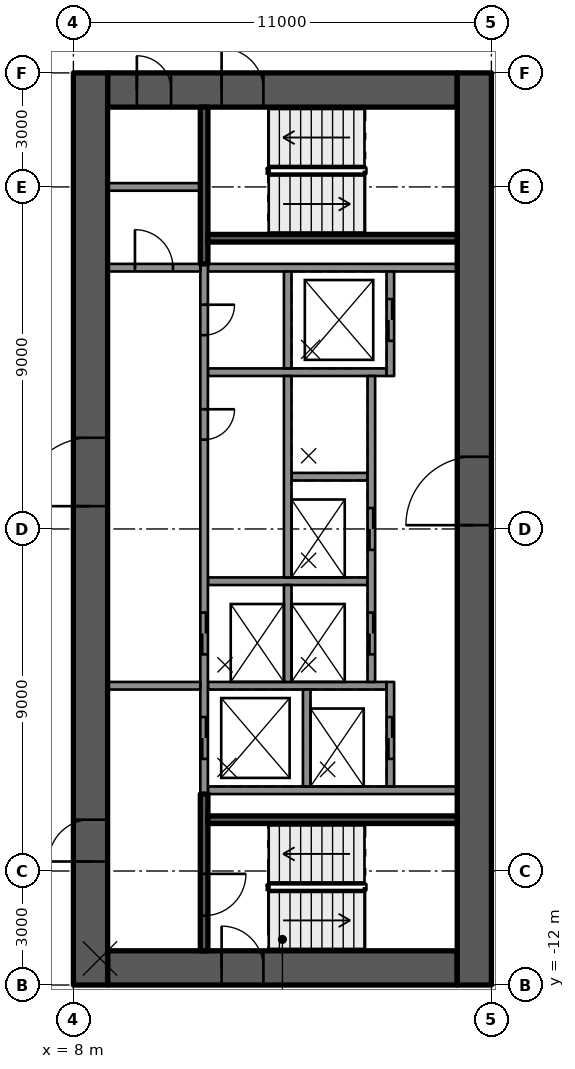
"""IFC4 building model, lengths in metres.
Left out: names, types, materials, properties, quantities, classifications, styles, units other than length and angle.
Written with IfcOpenShell. Run it as: python <this file> out.ifc"""

import sys

from ifc_helpers import new_model, si_unit, direction, frame, frame_2d, origin, place, context, subcontext, project, spatial, rectangle, extrude, element, fill, save


model = new_model("IFC4")
c1 = context("Model", 3, precision=1e-05, world=origin(), true_north=direction((0.0, 1.0)))
c2 = subcontext(c1, "Body", "Model", "MODEL_VIEW")
j1 = project(units=[si_unit("LENGTHUNIT", "METRE"), si_unit("PLANEANGLEUNIT", "RADIAN")], contexts=[c1])
p1 = place(None, origin())
s1 = spatial("IfcSite", under=j1, at=p1, CompositionType="ELEMENT")
p2 = place(p1, origin())
s2 = spatial("IfcBuilding", under=s1, at=p2, CompositionType="ELEMENT")
p3 = place(p2, frame((0.0, 0.0, 149.1)))
s3 = spatial("IfcBuildingStorey", under=s2, at=p3, CompositionType="ELEMENT", Elevation=149.1)
p4 = place(p3, frame((8.9, 11.55, 0.0), z_axis=(0.0, 0.0, 1.0), x_axis=(1.0, 0.0, 0.0)))
e1 = element("IfcWall", 1, at=p4, inside=s3, PredefinedType="SHEAR", context=c2, shape_type="SweptSolid", body=[
    extrude(rectangle(XDim=9.2, YDim=0.9, at=frame_2d((4.6, 0.0))), origin(), (0.0, 0.0, 1.0), 3.5),
])
p5 = place(p4, frame((3.0, 0.0, 0.0)))
e2 = element("IfcOpeningElement", 2, at=p5, cuts=e1, PredefinedType="OPENING", context=c2, shape_type="SweptSolid", body=[
    extrude(rectangle(XDim=1.1, YDim=2.1, at=frame_2d((0.55, 1.05))), frame((0.0, 0.46, 0.0), z_axis=(0.0, -1.0, 0.0), x_axis=(1.0, 0.0, 0.0)), (0.0, 0.0, 1.0), 0.92),
])
p6 = place(p4, frame((0.77, 0.0, 0.0)))
e3 = element("IfcOpeningElement", 3, at=p6, cuts=e1, PredefinedType="OPENING", context=c2, shape_type="SweptSolid", body=[
    extrude(rectangle(XDim=0.9, YDim=2.1, at=frame_2d((0.45, 1.05))), frame((0.0, 0.46, 0.0), z_axis=(0.0, -1.0, 0.0), x_axis=(1.0, 0.0, 0.0)), (0.0, 0.0, 1.0), 0.92),
])
p7 = place(p3, frame((8.9, -11.55, 0.0), z_axis=(0.0, 0.0, 1.0), x_axis=(1.0, 0.0, 0.0)))
e4 = element("IfcWall", 4, at=p7, inside=s3, PredefinedType="SHEAR", context=c2, shape_type="SweptSolid", body=[
    extrude(rectangle(XDim=9.2, YDim=0.9, at=frame_2d((4.6, 0.0))), origin(), (0.0, 0.0, 1.0), 3.5),
])
p8 = place(p7, frame((3.0, 0.0, 0.0)))
e5 = element("IfcOpeningElement", 5, at=p8, cuts=e4, PredefinedType="OPENING", context=c2, shape_type="SweptSolid", body=[
    extrude(rectangle(XDim=1.1, YDim=2.1, at=frame_2d((0.55, 1.05))), frame((0.0, 0.46, 0.0), z_axis=(0.0, -1.0, 0.0), x_axis=(1.0, 0.0, 0.0)), (0.0, 0.0, 1.0), 0.92),
])
p9 = place(p3, frame((8.45, -12.0, 0.0), z_axis=(0.0, 0.0, 1.0), x_axis=(0.0, 1.0, 0.0)))
e6 = element("IfcWall", 6, at=p9, inside=s3, PredefinedType="SHEAR", context=c2, shape_type="SweptSolid", body=[
    extrude(rectangle(XDim=24.0, YDim=0.9, at=frame_2d((12.0, 0.0))), origin(), (0.0, 0.0, 1.0), 3.5),
])
p10 = place(p9, frame((12.6, 0.0, 0.0)))
e7 = element("IfcOpeningElement", 7, at=p10, cuts=e6, PredefinedType="OPENING", context=c2, shape_type="SweptSolid", body=[
    extrude(rectangle(XDim=1.8, YDim=2.1, at=frame_2d((0.9, 1.05))), frame((0.0, 0.46, 0.0), z_axis=(0.0, -1.0, 0.0), x_axis=(1.0, 0.0, 0.0)), (0.0, 0.0, 1.0), 0.92),
])
p11 = place(p9, frame((3.25, 0.0, 0.0)))
e8 = element("IfcOpeningElement", 8, at=p11, cuts=e6, PredefinedType="OPENING", context=c2, shape_type="SweptSolid", body=[
    extrude(rectangle(XDim=1.1, YDim=2.1, at=frame_2d((0.55, 1.05))), frame((0.0, 0.46, 0.0), z_axis=(0.0, -1.0, 0.0), x_axis=(1.0, 0.0, 0.0)), (0.0, 0.0, 1.0), 0.92),
])
p12 = place(p3, frame((18.55, -12.0, 0.0), z_axis=(0.0, 0.0, 1.0), x_axis=(0.0, 1.0, 0.0)))
e9 = element("IfcWall", 9, at=p12, inside=s3, PredefinedType="SHEAR", context=c2, shape_type="SweptSolid", body=[
    extrude(rectangle(XDim=24.0, YDim=0.9, at=frame_2d((12.0, 0.0))), origin(), (0.0, 0.0, 1.0), 3.5),
])
p13 = place(p12, frame((12.1, 0.0, 0.0)))
e10 = element("IfcOpeningElement", 10, at=p13, cuts=e9, PredefinedType="OPENING", context=c2, shape_type="SweptSolid", body=[
    extrude(rectangle(XDim=1.8, YDim=2.1, at=frame_2d((0.9, 1.05))), frame((0.0, 0.46, 0.0), z_axis=(0.0, -1.0, 0.0), x_axis=(1.0, 0.0, 0.0)), (0.0, 0.0, 1.0), 0.92),
])
for number, where, z_axis, x_axis in (
    (11, (11.54, -6.875, 0.0), (0.0, 0.0, 1.0), (1.0, 0.0, 0.0)),
    (12, (11.54, 6.875, 0.0), (0.0, 0.0, 1.0), (1.0, 0.0, 0.0)),
):
    element("IfcWall", number, at=place(p3, frame(where, z_axis=z_axis, x_axis=x_axis)), inside=s3, PredefinedType="SOLIDWALL", context=c2, shape_type="SweptSolid", body=[
        extrude(rectangle(XDim=6.56, YDim=0.2, at=frame_2d((3.28, 0.0))), origin(), (0.0, 0.0, 1.0), 3.09),
    ])
p14 = place(p3, frame((11.54, 4.125, 0.0), z_axis=(0.0, 0.0, 1.0), x_axis=(1.0, 0.0, 0.0)))
e13 = element("IfcWall", 13, at=p14, inside=s3, PredefinedType="SOLIDWALL", context=c2, shape_type="SweptSolid", body=[
    extrude(rectangle(XDim=4.7, YDim=0.2, at=frame_2d((2.35, 0.0))), origin(), (0.0, 0.0, 1.0), 3.09),
])
p15 = place(p3, frame((13.74, 1.375, 0.0), z_axis=(0.0, 0.0, 1.0), x_axis=(1.0, 0.0, 0.0)))
e14 = element("IfcWall", 14, at=p15, inside=s3, PredefinedType="SOLIDWALL", context=c2, shape_type="SweptSolid", body=[
    extrude(rectangle(XDim=2.0, YDim=0.2, at=frame_2d((1.0, 0.0))), origin(), (0.0, 0.0, 1.0), 3.09),
])
p16 = place(p3, frame((11.54, -1.375, 0.0), z_axis=(0.0, 0.0, 1.0), x_axis=(1.0, 0.0, 0.0)))
e15 = element("IfcWall", 15, at=p16, inside=s3, PredefinedType="SOLIDWALL", context=c2, shape_type="SweptSolid", body=[
    extrude(rectangle(XDim=4.2, YDim=0.2, at=frame_2d((2.1, 0.0))), origin(), (0.0, 0.0, 1.0), 3.09),
])
p17 = place(p3, frame((11.54, -4.125, 0.0), z_axis=(0.0, 0.0, 1.0), x_axis=(1.0, 0.0, 0.0)))
e16 = element("IfcWall", 16, at=p17, inside=s3, PredefinedType="SOLIDWALL", context=c2, shape_type="SweptSolid", body=[
    extrude(rectangle(XDim=4.7, YDim=0.2, at=frame_2d((2.35, 0.0))), origin(), (0.0, 0.0, 1.0), 3.09),
])
p18 = place(p3, frame((11.44, 6.975, 0.0), z_axis=(0.0, 0.0, 1.0), x_axis=(0.0, -1.0, 0.0)))
e17 = element("IfcWall", 17, at=p18, inside=s3, PredefinedType="SOLIDWALL", context=c2, shape_type="SweptSolid", body=[
    extrude(rectangle(XDim=13.95, YDim=0.2, at=frame_2d((6.975, 0.0))), origin(), (0.0, 0.0, 1.0), 3.09),
])
p19 = place(p18, frame((9.175, 0.0, 0.0)))
e18 = element("IfcOpeningElement", 18, at=p19, cuts=e17, PredefinedType="OPENING", context=c2, shape_type="SweptSolid", body=[
    extrude(rectangle(XDim=1.1, YDim=2.1, at=frame_2d((0.55, 1.05))), frame((0.0, 0.11, 0.0), z_axis=(0.0, -1.0, 0.0), x_axis=(1.0, 0.0, 0.0)), (0.0, 0.0, 1.0), 0.22),
])
p20 = place(p18, frame((11.925, 0.0, 0.0)))
e19 = element("IfcOpeningElement", 19, at=p20, cuts=e17, PredefinedType="OPENING", context=c2, shape_type="SweptSolid", body=[
    extrude(rectangle(XDim=1.1, YDim=2.1, at=frame_2d((0.55, 1.05))), frame((0.0, 0.11, 0.0), z_axis=(0.0, -1.0, 0.0), x_axis=(1.0, 0.0, 0.0)), (0.0, 0.0, 1.0), 0.22),
])
p21 = place(p18, frame((1.075, 0.0, 0.0)))
e20 = element("IfcOpeningElement", 20, at=p21, cuts=e17, PredefinedType="OPENING", context=c2, shape_type="SweptSolid", body=[
    extrude(rectangle(XDim=0.8, YDim=2.1, at=frame_2d((0.4, 1.05))), frame((0.0, 0.11, 0.0), z_axis=(0.0, -1.0, 0.0), x_axis=(1.0, 0.0, 0.0)), (0.0, 0.0, 1.0), 0.22),
])
p22 = place(p18, frame((3.825, 0.0, 0.0)))
e21 = element("IfcOpeningElement", 21, at=p22, cuts=e17, PredefinedType="OPENING", context=c2, shape_type="SweptSolid", body=[
    extrude(rectangle(XDim=0.8, YDim=2.1, at=frame_2d((0.4, 1.05))), frame((0.0, 0.11, 0.0), z_axis=(0.0, -1.0, 0.0), x_axis=(1.0, 0.0, 0.0)), (0.0, 0.0, 1.0), 0.22),
])
p23 = place(p3, frame((13.64, 6.775, 0.0), z_axis=(0.0, 0.0, 1.0), x_axis=(0.0, -1.0, 0.0)))
e22 = element("IfcWall", 22, at=p23, inside=s3, PredefinedType="SOLIDWALL", context=c2, shape_type="SweptSolid", body=[
    extrude(rectangle(XDim=2.55, YDim=0.2, at=frame_2d((1.275, 0.0))), origin(), (0.0, 0.0, 1.0), 3.09),
])
p24 = place(p3, frame((13.64, 4.025, 0.0), z_axis=(0.0, 0.0, 1.0), x_axis=(0.0, -1.0, 0.0)))
e23 = element("IfcWall", 23, at=p24, inside=s3, PredefinedType="SOLIDWALL", context=c2, shape_type="SweptSolid", body=[
    extrude(rectangle(XDim=5.3, YDim=0.2, at=frame_2d((2.65, 0.0))), origin(), (0.0, 0.0, 1.0), 3.09),
])
for number, where, z_axis, x_axis in (
    (24, (13.64, -1.475, 0.0), (0.0, 0.0, 1.0), (0.0, -1.0, 0.0)),
    (25, (14.14, -4.225, 0.0), (0.0, 0.0, 1.0), (0.0, -1.0, 0.0)),
):
    element("IfcWall", number, at=place(p3, frame(where, z_axis=z_axis, x_axis=x_axis)), inside=s3, PredefinedType="SOLIDWALL", context=c2, shape_type="SweptSolid", body=[
        extrude(rectangle(XDim=2.55, YDim=0.2, at=frame_2d((1.275, 0.0))), origin(), (0.0, 0.0, 1.0), 3.09),
    ])
p25 = place(p3, frame((16.34, 6.775, 0.0), z_axis=(0.0, 0.0, 1.0), x_axis=(0.0, -1.0, 0.0)))
e26 = element("IfcWall", 26, at=p25, inside=s3, PredefinedType="SOLIDWALL", context=c2, shape_type="SweptSolid", body=[
    extrude(rectangle(XDim=2.75, YDim=0.2, at=frame_2d((1.375, 0.0))), origin(), (0.0, 0.0, 1.0), 3.09),
])
p26 = place(p25, frame((0.725, 0.0, 0.0)))
e27 = element("IfcOpeningElement", 27, at=p26, cuts=e26, PredefinedType="OPENING", context=c2, shape_type="SweptSolid", body=[
    extrude(rectangle(XDim=1.1, YDim=2.1, at=frame_2d((0.55, 1.05))), frame((0.0, 0.11, 0.0), z_axis=(0.0, -1.0, 0.0), x_axis=(1.0, 0.0, 0.0)), (0.0, 0.0, 1.0), 0.22),
])
p27 = place(p3, frame((15.84, 4.025, 0.0), z_axis=(0.0, 0.0, 1.0), x_axis=(0.0, -1.0, 0.0)))
e28 = element("IfcWall", 28, at=p27, inside=s3, PredefinedType="SOLIDWALL", context=c2, shape_type="SweptSolid", body=[
    extrude(rectangle(XDim=8.05, YDim=0.2, at=frame_2d((4.025, 0.0))), origin(), (0.0, 0.0, 1.0), 3.09),
])
p28 = place(p27, frame((3.475, 0.0, 0.0)))
e29 = element("IfcOpeningElement", 29, at=p28, cuts=e28, PredefinedType="OPENING", context=c2, shape_type="SweptSolid", body=[
    extrude(rectangle(XDim=1.1, YDim=2.1, at=frame_2d((0.55, 1.05))), frame((0.0, 0.11, 0.0), z_axis=(0.0, -1.0, 0.0), x_axis=(1.0, 0.0, 0.0)), (0.0, 0.0, 1.0), 0.22),
])
p29 = place(p27, frame((6.225, 0.0, 0.0)))
e30 = element("IfcOpeningElement", 30, at=p29, cuts=e28, PredefinedType="OPENING", context=c2, shape_type="SweptSolid", body=[
    extrude(rectangle(XDim=1.1, YDim=2.1, at=frame_2d((0.55, 1.05))), frame((0.0, 0.11, 0.0), z_axis=(0.0, -1.0, 0.0), x_axis=(1.0, 0.0, 0.0)), (0.0, 0.0, 1.0), 0.22),
])
p30 = place(p3, frame((16.34, -4.025, 0.0), z_axis=(0.0, 0.0, 1.0), x_axis=(0.0, -1.0, 0.0)))
e31 = element("IfcWall", 31, at=p30, inside=s3, PredefinedType="SOLIDWALL", context=c2, shape_type="SweptSolid", body=[
    extrude(rectangle(XDim=2.75, YDim=0.2, at=frame_2d((1.375, 0.0))), origin(), (0.0, 0.0, 1.0), 3.09),
])
p31 = place(p30, frame((0.925, 0.0, 0.0)))
e32 = element("IfcOpeningElement", 32, at=p31, cuts=e31, PredefinedType="OPENING", context=c2, shape_type="SweptSolid", body=[
    extrude(rectangle(XDim=1.1, YDim=2.1, at=frame_2d((0.55, 1.05))), frame((0.0, 0.11, 0.0), z_axis=(0.0, -1.0, 0.0), x_axis=(1.0, 0.0, 0.0)), (0.0, 0.0, 1.0), 0.22),
])
p32 = place(p3, frame((11.44, -6.975, 0.0), z_axis=(0.0, 0.0, 1.0), x_axis=(0.0, -1.0, 0.0)))
e33 = element("IfcWall", 33, at=p32, inside=s3, PredefinedType="SOLIDWALL", context=c2, shape_type="SweptSolid", body=[
    extrude(rectangle(XDim=4.125, YDim=0.2, at=frame_2d((2.062, 0.0))), origin(), (0.0, 0.0, 1.0), 3.09),
])
p33 = place(p32, frame((2.1, 0.0, 0.0)))
e34 = element("IfcOpeningElement", 34, at=p33, cuts=e33, PredefinedType="OPENING", context=c2, shape_type="SweptSolid", body=[
    extrude(rectangle(XDim=1.1, YDim=2.1, at=frame_2d((0.55, 1.05))), frame((0.0, 0.11, 0.0), z_axis=(0.0, -1.0, 0.0), x_axis=(1.0, 0.0, 0.0)), (0.0, 0.0, 1.0), 0.22),
])
p34 = place(p3, frame((11.54, -7.65, 0.0), z_axis=(0.0, 0.0, 1.0), x_axis=(1.0, 0.0, 0.0)))
e35 = element("IfcWall", 35, at=p34, inside=s3, PredefinedType="SOLIDWALL", context=c2, shape_type="SweptSolid", body=[
    extrude(rectangle(XDim=6.56, YDim=0.2, at=frame_2d((3.28, 0.0))), origin(), (0.0, 0.0, 1.0), 3.09),
])
p35 = place(p3, frame((11.44, 11.1, 0.0), z_axis=(0.0, 0.0, 1.0), x_axis=(0.0, -1.0, 0.0)))
e36 = element("IfcWall", 36, at=p35, inside=s3, PredefinedType="SOLIDWALL", context=c2, shape_type="SweptSolid", body=[
    extrude(rectangle(XDim=4.125, YDim=0.2, at=frame_2d((2.062, 0.0))), origin(), (0.0, 0.0, 1.0), 3.09),
])
p36 = place(p3, frame((11.54, 7.65, 0.0), z_axis=(0.0, 0.0, 1.0), x_axis=(1.0, 0.0, 0.0)))
e37 = element("IfcWall", 37, at=p36, inside=s3, PredefinedType="SOLIDWALL", context=c2, shape_type="SweptSolid", body=[
    extrude(rectangle(XDim=6.56, YDim=0.2, at=frame_2d((3.28, 0.0))), origin(), (0.0, 0.0, 1.0), 3.09),
])
p37 = place(p3, frame((8.9, -4.125, 0.0), z_axis=(0.0, 0.0, 1.0), x_axis=(1.0, 0.0, 0.0)))
e38 = element("IfcWall", 38, at=p37, inside=s3, PredefinedType="PARTITIONING", context=c2, shape_type="SweptSolid", body=[
    extrude(rectangle(XDim=2.44, YDim=0.2, at=frame_2d((1.22, 0.0))), origin(), (0.0, 0.0, 1.0), 3.09),
])
p38 = place(p3, frame((8.9, 6.875, 0.0), z_axis=(0.0, 0.0, 1.0), x_axis=(1.0, 0.0, 0.0)))
e39 = element("IfcWall", 39, at=p38, inside=s3, PredefinedType="PARTITIONING", context=c2, shape_type="SweptSolid", body=[
    extrude(rectangle(XDim=2.44, YDim=0.2, at=frame_2d((1.22, 0.0))), origin(), (0.0, 0.0, 1.0), 3.09),
])
p39 = place(p38, frame((0.72, 0.0, 0.0)))
e40 = element("IfcOpeningElement", 40, at=p39, cuts=e39, PredefinedType="OPENING", context=c2, shape_type="SweptSolid", body=[
    extrude(rectangle(XDim=1.0, YDim=2.1, at=frame_2d((0.5, 1.05))), frame((0.0, 0.11, 0.0), z_axis=(0.0, -1.0, 0.0), x_axis=(1.0, 0.0, 0.0)), (0.0, 0.0, 1.0), 0.22),
])
p40 = place(p3, frame((8.9, 9.0, 0.0), z_axis=(0.0, 0.0, 1.0), x_axis=(1.0, 0.0, 0.0)))
e41 = element("IfcWall", 41, at=p40, inside=s3, PredefinedType="PARTITIONING", context=c2, shape_type="SweptSolid", body=[
    extrude(rectangle(XDim=2.44, YDim=0.2, at=frame_2d((1.22, 0.0))), origin(), (0.0, 0.0, 1.0), 3.09),
])
p41 = place(p26, origin())
e42 = element("IfcDoor", 42, at=p41, inside=s3, OperationType="DOUBLE_DOOR_SLIDING", PredefinedType="DOOR", context=c2, shape_type="SweptSolid", body=[
    extrude(rectangle(XDim=1.1, YDim=2.1, at=frame_2d((0.55, 1.05))), frame((0.0, 0.025, 0.0), z_axis=(0.0, -1.0, 0.0), x_axis=(1.0, 0.0, 0.0)), (0.0, 0.0, 1.0), 0.05),
])
fill(e27, e42)
p42 = place(p28, origin())
e43 = element("IfcDoor", 43, at=p42, inside=s3, OperationType="DOUBLE_DOOR_SLIDING", PredefinedType="DOOR", context=c2, shape_type="SweptSolid", body=[
    extrude(rectangle(XDim=1.1, YDim=2.1, at=frame_2d((0.55, 1.05))), frame((0.0, 0.025, 0.0), z_axis=(0.0, -1.0, 0.0), x_axis=(1.0, 0.0, 0.0)), (0.0, 0.0, 1.0), 0.05),
])
fill(e29, e43)
p43 = place(p19, origin())
e44 = element("IfcDoor", 44, at=p43, inside=s3, OperationType="DOUBLE_DOOR_SLIDING", PredefinedType="DOOR", context=c2, shape_type="SweptSolid", body=[
    extrude(rectangle(XDim=1.1, YDim=2.1, at=frame_2d((0.55, 1.05))), frame((0.0, 0.025, 0.0), z_axis=(0.0, -1.0, 0.0), x_axis=(1.0, 0.0, 0.0)), (0.0, 0.0, 1.0), 0.05),
])
fill(e18, e44)
p44 = place(p29, origin())
e45 = element("IfcDoor", 45, at=p44, inside=s3, OperationType="DOUBLE_DOOR_SLIDING", PredefinedType="DOOR", context=c2, shape_type="SweptSolid", body=[
    extrude(rectangle(XDim=1.1, YDim=2.1, at=frame_2d((0.55, 1.05))), frame((0.0, 0.025, 0.0), z_axis=(0.0, -1.0, 0.0), x_axis=(1.0, 0.0, 0.0)), (0.0, 0.0, 1.0), 0.05),
])
fill(e30, e45)
p45 = place(p20, origin())
e46 = element("IfcDoor", 46, at=p45, inside=s3, OperationType="DOUBLE_DOOR_SLIDING", PredefinedType="DOOR", context=c2, shape_type="SweptSolid", body=[
    extrude(rectangle(XDim=1.1, YDim=2.1, at=frame_2d((0.55, 1.05))), frame((0.0, 0.025, 0.0), z_axis=(0.0, -1.0, 0.0), x_axis=(1.0, 0.0, 0.0)), (0.0, 0.0, 1.0), 0.05),
])
fill(e19, e46)
p46 = place(p31, origin())
e47 = element("IfcDoor", 47, at=p46, inside=s3, OperationType="DOUBLE_DOOR_SLIDING", PredefinedType="DOOR", context=c2, shape_type="SweptSolid", body=[
    extrude(rectangle(XDim=1.1, YDim=2.1, at=frame_2d((0.55, 1.05))), frame((0.0, 0.025, 0.0), z_axis=(0.0, -1.0, 0.0), x_axis=(1.0, 0.0, 0.0)), (0.0, 0.0, 1.0), 0.05),
])
fill(e32, e47)
p47 = place(p21, origin())
e48 = element("IfcDoor", 48, at=p47, inside=s3, OperationType="SINGLE_SWING_LEFT", PredefinedType="DOOR", context=c2, shape_type="SweptSolid", body=[
    extrude(rectangle(XDim=0.8, YDim=2.1, at=frame_2d((0.4, 1.05))), frame((0.0, 0.025, 0.0), z_axis=(0.0, -1.0, 0.0), x_axis=(1.0, 0.0, 0.0)), (0.0, 0.0, 1.0), 0.05),
])
fill(e20, e48)
p48 = place(p22, origin())
e49 = element("IfcDoor", 49, at=p48, inside=s3, OperationType="SINGLE_SWING_LEFT", PredefinedType="DOOR", context=c2, shape_type="SweptSolid", body=[
    extrude(rectangle(XDim=0.8, YDim=2.1, at=frame_2d((0.4, 1.05))), frame((0.0, 0.025, 0.0), z_axis=(0.0, -1.0, 0.0), x_axis=(1.0, 0.0, 0.0)), (0.0, 0.0, 1.0), 0.05),
])
fill(e21, e49)
p49 = place(p10, origin())
e50 = element("IfcDoor", 50, at=p49, inside=s3, OperationType="SINGLE_SWING_RIGHT", PredefinedType="DOOR", context=c2, shape_type="SweptSolid", body=[
    extrude(rectangle(XDim=1.8, YDim=2.1, at=frame_2d((0.9, 1.05))), frame((0.0, 0.025, 0.0), z_axis=(0.0, -1.0, 0.0), x_axis=(1.0, 0.0, 0.0)), (0.0, 0.0, 1.0), 0.05),
])
fill(e7, e50)
p50 = place(p13, origin())
e51 = element("IfcDoor", 51, at=p50, inside=s3, OperationType="SINGLE_SWING_RIGHT", PredefinedType="DOOR", context=c2, shape_type="SweptSolid", body=[
    extrude(rectangle(XDim=1.8, YDim=2.1, at=frame_2d((0.9, 1.05))), frame((0.0, 0.025, 0.0), z_axis=(0.0, -1.0, 0.0), x_axis=(1.0, 0.0, 0.0)), (0.0, 0.0, 1.0), 0.05),
])
fill(e10, e51)
p51 = place(p11, origin())
e52 = element("IfcDoor", 52, at=p51, inside=s3, OperationType="SINGLE_SWING_LEFT", PredefinedType="DOOR", context=c2, shape_type="SweptSolid", body=[
    extrude(rectangle(XDim=1.1, YDim=2.1, at=frame_2d((0.55, 1.05))), frame((0.0, 0.025, 0.0), z_axis=(0.0, -1.0, 0.0), x_axis=(1.0, 0.0, 0.0)), (0.0, 0.0, 1.0), 0.05),
])
fill(e8, e52)
p52 = place(p8, origin())
e53 = element("IfcDoor", 53, at=p52, inside=s3, OperationType="SINGLE_SWING_LEFT", PredefinedType="DOOR", context=c2, shape_type="SweptSolid", body=[
    extrude(rectangle(XDim=1.1, YDim=2.1, at=frame_2d((0.55, 1.05))), frame((0.0, 0.025, 0.0), z_axis=(0.0, -1.0, 0.0), x_axis=(1.0, 0.0, 0.0)), (0.0, 0.0, 1.0), 0.05),
])
fill(e5, e53)
p53 = place(p5, origin())
e54 = element("IfcDoor", 54, at=p53, inside=s3, OperationType="SINGLE_SWING_LEFT", PredefinedType="DOOR", context=c2, shape_type="SweptSolid", body=[
    extrude(rectangle(XDim=1.1, YDim=2.1, at=frame_2d((0.55, 1.05))), frame((0.0, 0.025, 0.0), z_axis=(0.0, -1.0, 0.0), x_axis=(1.0, 0.0, 0.0)), (0.0, 0.0, 1.0), 0.05),
])
fill(e2, e54)
p54 = place(p33, origin())
e55 = element("IfcDoor", 55, at=p54, inside=s3, OperationType="SINGLE_SWING_RIGHT", PredefinedType="DOOR", context=c2, shape_type="SweptSolid", body=[
    extrude(rectangle(XDim=1.1, YDim=2.1, at=frame_2d((0.55, 1.05))), frame((0.0, 0.025, 0.0), z_axis=(0.0, -1.0, 0.0), x_axis=(1.0, 0.0, 0.0)), (0.0, 0.0, 1.0), 0.05),
])
fill(e34, e55)
p55 = place(p6, origin())
e56 = element("IfcDoor", 56, at=p55, inside=s3, OperationType="SINGLE_SWING_LEFT", PredefinedType="DOOR", context=c2, shape_type="SweptSolid", body=[
    extrude(rectangle(XDim=0.9, YDim=2.1, at=frame_2d((0.45, 1.05))), frame((0.0, 0.025, 0.0), z_axis=(0.0, -1.0, 0.0), x_axis=(1.0, 0.0, 0.0)), (0.0, 0.0, 1.0), 0.05),
])
fill(e3, e56)
p56 = place(p39, origin())
e57 = element("IfcDoor", 57, at=p56, inside=s3, OperationType="SINGLE_SWING_RIGHT", PredefinedType="DOOR", context=c2, shape_type="SweptSolid", body=[
    extrude(rectangle(XDim=1.0, YDim=2.1, at=frame_2d((0.5, 1.05))), frame((0.0, 0.025, 0.0), z_axis=(0.0, -1.0, 0.0), x_axis=(1.0, 0.0, 0.0)), (0.0, 0.0, 1.0), 0.05),
])
fill(e40, e57)
save(model, sys.argv[1])
